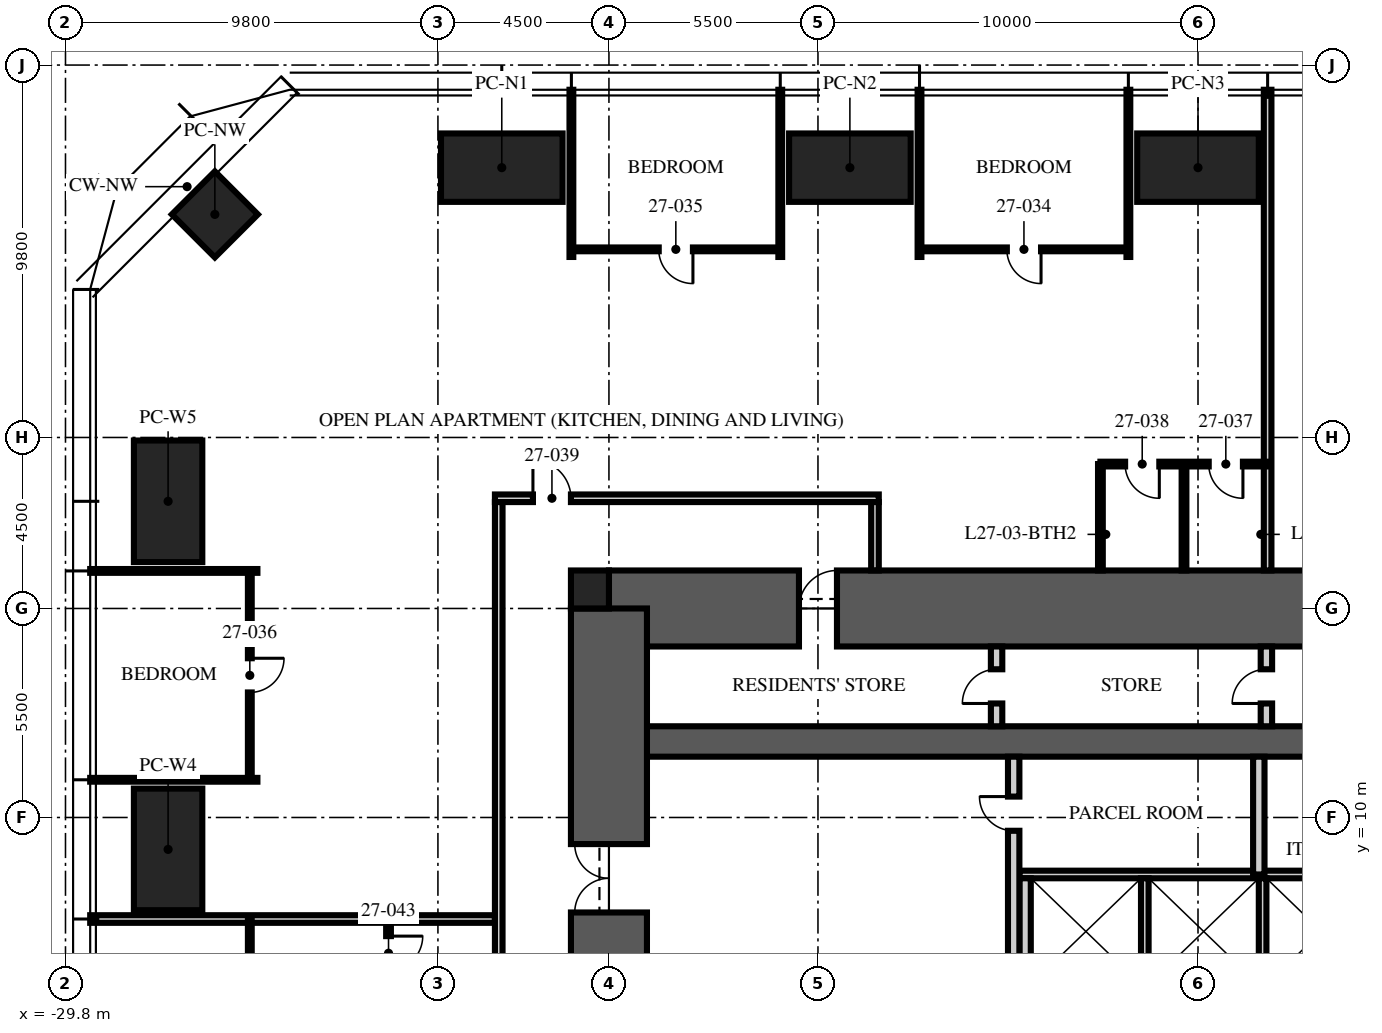
"""IFC4 building model, lengths in metres.
Left out: names, types, materials, properties, quantities, classifications, styles, units other than length and angle.
Written with IfcOpenShell. Run it as: python <this file> out.ifc"""

import sys

from ifc_helpers import new_model, si_unit, direction, frame, frame_2d, origin, origin_2d, place, context, subcontext, project, spatial, rectangle, hollow_rectangle, extrude, element, fill, save


model = new_model("IFC4")
c1 = context("Model", 3, precision=1e-05, world=origin(), true_north=direction((0.0, 1.0)))
c2 = subcontext(c1, "Body", "Model", "MODEL_VIEW")
j1 = project(units=[si_unit("LENGTHUNIT", "METRE"), si_unit("PLANEANGLEUNIT", "RADIAN")], contexts=[c1])
p1 = place(None, origin())
s1 = spatial("IfcSite", under=j1, at=p1, CompositionType="ELEMENT")
p2 = place(p1, origin())
s2 = spatial("IfcBuilding", under=s1, at=p2, CompositionType="ELEMENT")
p3 = place(p2, frame((0.0, 0.0, 111.0)))
s3 = spatial("IfcBuildingStorey", under=s2, at=p3, CompositionType="ELEMENT", Elevation=111.0)
p4 = place(p3, frame((-15.5, 15.5, -0.25), z_axis=(0.0, 0.0, 1.0), x_axis=(1.0, 0.0, 0.0)))
e1 = element("IfcWall", 1, at=p4, inside=s3, PredefinedType="SHEAR", context=c2, shape_type="SweptSolid", body=[
    extrude(rectangle(XDim=31.0, YDim=2.0, at=frame_2d((15.5, 0.0))), origin(), (0.0, 0.0, 1.0), 3.75),
])
p5 = place(p4, frame((5.0, 0.0, 0.25)))
e2 = element("IfcOpeningElement", 2, at=p5, cuts=e1, PredefinedType="OPENING", context=c2, shape_type="SweptSolid", body=[
    extrude(rectangle(XDim=1.0, YDim=2.1, at=frame_2d((0.5, 1.05))), frame((0.0, 1.01, 0.0), z_axis=(0.0, -1.0, 0.0), x_axis=(1.0, 0.0, 0.0)), (0.0, 0.0, 1.0), 2.02),
])
p6 = place(p3, frame((-15.5, 12.0, -0.25), z_axis=(0.0, 0.0, 1.0), x_axis=(1.0, 0.0, 0.0)))
e3 = element("IfcWall", 3, at=p6, inside=s3, PredefinedType="SHEAR", context=c2, shape_type="SweptSolid", body=[
    extrude(rectangle(XDim=31.0, YDim=0.8, at=frame_2d((15.5, 0.0))), origin(), (0.0, 0.0, 1.0), 3.75),
])
p7 = place(p3, frame((-15.5, -15.5, -0.25), z_axis=(0.0, 0.0, 1.0), x_axis=(0.0, 1.0, 0.0)))
e4 = element("IfcWall", 4, at=p7, inside=s3, PredefinedType="SHEAR", context=c2, shape_type="SweptSolid", body=[
    extrude(rectangle(XDim=31.0, YDim=2.0, at=frame_2d((15.5, 0.0))), origin(), (0.0, 0.0, 1.0), 3.75),
])
p8 = place(p7, frame((6.5, 0.0, 0.25)))
e5 = element("IfcOpeningElement", 5, at=p8, cuts=e4, PredefinedType="OPENING", context=c2, shape_type="SweptSolid", body=[
    extrude(rectangle(XDim=1.2, YDim=2.1, at=frame_2d((0.6, 1.05))), frame((0.0, 1.01, 0.0), z_axis=(0.0, -1.0, 0.0), x_axis=(1.0, 0.0, 0.0)), (0.0, 0.0, 1.0), 2.02),
])
p9 = place(p7, frame((23.0, 0.0, 0.25)))
e6 = element("IfcOpeningElement", 6, at=p9, cuts=e4, PredefinedType="OPENING", context=c2, shape_type="SweptSolid", body=[
    extrude(rectangle(XDim=1.8, YDim=2.1, at=frame_2d((0.9, 1.05))), frame((0.0, 1.01, 0.0), z_axis=(0.0, -1.0, 0.0), x_axis=(1.0, 0.0, 0.0)), (0.0, 0.0, 1.0), 2.02),
])
p10 = place(p3, frame((-16.0, 16.0, -0.25), z_axis=(0.0, 0.0, 1.0), x_axis=(1.0, 0.0, 0.0)))
e7 = element("IfcColumn", 7, at=p10, inside=s3, PredefinedType="COLUMN", context=c2, shape_type="SweptSolid", body=[
    extrude(rectangle(XDim=1.0, YDim=1.0, at=origin_2d()), origin(), (0.0, 0.0, 1.0), 3.75),
])
for number, where, z_axis, x_axis in (
    (8, (-18.32, 27.1, 0.0), (0.0, 0.0, 1.0), (1.0, 0.0, 0.0)),
    (9, (-9.16, 27.1, 0.0), (0.0, 0.0, 1.0), (1.0, 0.0, 0.0)),
    (10, (0.0, 27.1, 0.0), (0.0, 0.0, 1.0), (1.0, 0.0, 0.0)),
    (11, (-27.1, 9.16, 0.0), (0.0, 0.0, 1.0), (0.0, 1.0, 0.0)),
    (12, (-27.1, 18.32, 0.0), (0.0, 0.0, 1.0), (0.0, 1.0, 0.0)),
):
    element("IfcColumn", number, at=place(p3, frame(where, z_axis=z_axis, x_axis=x_axis)), inside=s3, PredefinedType="COLUMN", context=c2, shape_type="SweptSolid", body=[
        extrude(hollow_rectangle(XDim=3.2, YDim=1.8, WallThickness=0.2, at=origin_2d()), origin(), (0.0, 0.0, 1.0), 3.75),
    ])
p11 = place(p3, frame((-25.87, 25.87, 0.0), z_axis=(0.0, 0.0, 1.0), x_axis=(0.707106781187, 0.707106781187, 0.0)))
e13 = element("IfcColumn", 13, at=p11, inside=s3, PredefinedType="COLUMN", context=c2, shape_type="SweptSolid", body=[
    extrude(hollow_rectangle(XDim=1.6, YDim=1.6, WallThickness=0.1, at=origin_2d()), origin(), (0.0, 0.0, 1.0), 3.75),
])
p12 = place(p3, frame((-4.7, 8.5, 0.0), z_axis=(0.0, 0.0, 1.0), x_axis=(1.0, 0.0, 0.0)))
e14 = element("IfcWall", 14, at=p12, inside=s3, PredefinedType="PARTITIONING", context=c2, shape_type="SweptSolid", body=[
    extrude(rectangle(XDim=9.7, YDim=0.2, at=frame_2d((4.85, 0.0))), origin(), (0.0, 0.0, 1.0), 3.5),
])
p13 = place(p3, frame((-4.55, 5.6, 0.0), z_axis=(0.0, 0.0, 1.0), x_axis=(0.0, 1.0, 0.0)))
e15 = element("IfcWall", 15, at=p13, inside=s3, PredefinedType="PARTITIONING", context=c2, shape_type="SweptSolid", body=[
    extrude(rectangle(XDim=2.8, YDim=0.3, at=frame_2d((1.4, 0.0))), origin(), (0.0, 0.0, 1.0), 3.5),
])
for number, where, z_axis, x_axis in (
    (16, (-1.4, 5.6, 0.0), (0.0, 0.0, 1.0), (0.0, 1.0, 0.0)),
    (17, (1.7, 5.6, 0.0), (0.0, 0.0, 1.0), (0.0, 1.0, 0.0)),
):
    element("IfcWall", number, at=place(p3, frame(where, z_axis=z_axis, x_axis=x_axis)), inside=s3, PredefinedType="PARTITIONING", context=c2, shape_type="SweptSolid", body=[
        extrude(rectangle(XDim=2.8, YDim=0.2, at=frame_2d((1.4, 0.0))), origin(), (0.0, 0.0, 1.0), 3.5),
    ])
p14 = place(p3, frame((-4.85, 5.3, 0.0), z_axis=(0.0, 0.0, 1.0), x_axis=(0.0, 1.0, 0.0)))
e18 = element("IfcWall", 18, at=p14, inside=s3, PredefinedType="PARTITIONING", context=c2, shape_type="SweptSolid", body=[
    extrude(rectangle(XDim=6.3, YDim=0.3, at=frame_2d((3.15, 0.0))), origin(), (0.0, 0.0, 1.0), 3.5),
])
p15 = place(p14, frame((4.35, 0.0, 0.0)))
e19 = element("IfcOpeningElement", 19, at=p15, cuts=e18, PredefinedType="OPENING", context=c2, shape_type="SweptSolid", body=[
    extrude(rectangle(XDim=0.9, YDim=2.1, at=frame_2d((0.45, 1.05))), frame((0.0, 0.16, 0.0), z_axis=(0.0, -1.0, 0.0), x_axis=(1.0, 0.0, 0.0)), (0.0, 0.0, 1.0), 0.32),
])
p16 = place(p3, frame((1.6, 8.5, 0.0), z_axis=(0.0, 0.0, 1.0), x_axis=(0.0, 1.0, 0.0)))
e20 = element("IfcWall", 20, at=p16, inside=s3, PredefinedType="PARTITIONING", context=c2, shape_type="SweptSolid", body=[
    extrude(rectangle(XDim=3.1, YDim=0.3, at=frame_2d((1.55, 0.0))), origin(), (0.0, 0.0, 1.0), 3.5),
])
p17 = place(p3, frame((-5.3, 12.4, 0.0), z_axis=(0.0, 0.0, 1.0), x_axis=(0.0, 1.0, 0.0)))
e21 = element("IfcWall", 21, at=p17, inside=s3, PredefinedType="PARTITIONING", context=c2, shape_type="SweptSolid", body=[
    extrude(rectangle(XDim=2.1, YDim=0.3, at=frame_2d((1.05, 0.0))), origin(), (0.0, 0.0, 1.0), 3.5),
])
p18 = place(p17, frame((0.6, 0.0, 0.0)))
e22 = element("IfcOpeningElement", 22, at=p18, cuts=e21, PredefinedType="OPENING", context=c2, shape_type="SweptSolid", body=[
    extrude(rectangle(XDim=0.9, YDim=2.1, at=frame_2d((0.45, 1.05))), frame((0.0, 0.16, 0.0), z_axis=(0.0, -1.0, 0.0), x_axis=(1.0, 0.0, 0.0)), (0.0, 0.0, 1.0), 0.32),
])
p19 = place(p3, frame((1.8, 12.4, 0.0), z_axis=(0.0, 0.0, 1.0), x_axis=(0.0, 1.0, 0.0)))
e23 = element("IfcWall", 23, at=p19, inside=s3, PredefinedType="PARTITIONING", context=c2, shape_type="SweptSolid", body=[
    extrude(rectangle(XDim=2.1, YDim=0.3, at=frame_2d((1.05, 0.0))), origin(), (0.0, 0.0, 1.0), 3.5),
])
p20 = place(p19, frame((0.6, 0.0, 0.0)))
e24 = element("IfcOpeningElement", 24, at=p20, cuts=e23, PredefinedType="OPENING", context=c2, shape_type="SweptSolid", body=[
    extrude(rectangle(XDim=0.9, YDim=2.1, at=frame_2d((0.45, 1.05))), frame((0.0, 0.16, 0.0), z_axis=(0.0, -1.0, 0.0), x_axis=(1.0, 0.0, 0.0)), (0.0, 0.0, 1.0), 0.32),
])
p21 = place(p3, frame((-18.5, 18.4, 0.0), z_axis=(0.0, 0.0, 1.0), x_axis=(1.0, 0.0, 0.0)))
e25 = element("IfcWall", 25, at=p21, inside=s3, PredefinedType="PARTITIONING", context=c2, shape_type="SweptSolid", body=[
    extrude(rectangle(XDim=10.1, YDim=0.2, at=frame_2d((5.05, 0.0))), origin(), (0.0, 0.0, 1.0), 2.3),
])
p22 = place(p21, frame((1.0, 0.0, 0.0)))
e26 = element("IfcOpeningElement", 26, at=p22, cuts=e25, PredefinedType="OPENING", context=c2, shape_type="SweptSolid", body=[
    extrude(rectangle(XDim=1.0, YDim=2.2, at=frame_2d((0.5, 1.1))), frame((0.0, 0.11, 0.0), z_axis=(0.0, -1.0, 0.0), x_axis=(1.0, 0.0, 0.0)), (0.0, 0.0, 1.0), 0.22),
])
p23 = place(p3, frame((-8.5, 18.3, 0.0), z_axis=(0.0, 0.0, 1.0), x_axis=(0.0, -1.0, 0.0)))
e27 = element("IfcWall", 27, at=p23, inside=s3, PredefinedType="PARTITIONING", context=c2, shape_type="SweptSolid", body=[
    extrude(rectangle(XDim=1.8, YDim=0.2, at=frame_2d((0.9, 0.0))), origin(), (0.0, 0.0, 1.0), 3.5),
])
p24 = place(p3, frame((1.832, 16.5, 0.0), z_axis=(0.0, 0.0, 1.0), x_axis=(0.0, 1.0, 0.0)))
e28 = element("IfcWall", 28, at=p24, inside=s3, PredefinedType="PARTITIONING", context=c2, shape_type="SweptSolid", body=[
    extrude(rectangle(XDim=12.65, YDim=0.2, at=frame_2d((6.325, 0.0))), origin(), (0.0, 0.0, 1.0), 2.81),
])
for number, where, z_axis, x_axis in (
    (29, (-1.832, 24.75, 0.0), (0.0, 0.0, 1.0), (0.0, 1.0, 0.0)),
    (30, (-7.328, 24.75, 0.0), (0.0, 0.0, 1.0), (0.0, 1.0, 0.0)),
    (31, (-10.992, 24.75, 0.0), (0.0, 0.0, 1.0), (0.0, 1.0, 0.0)),
    (32, (-16.488, 24.75, 0.0), (0.0, 0.0, 1.0), (0.0, 1.0, 0.0)),
    (33, (-24.75, 16.488, 0.0), (0.0, 0.0, 1.0), (-1.0, 0.0, 0.0)),
    (34, (-24.75, 10.992, 0.0), (0.0, 0.0, 1.0), (-1.0, 0.0, 0.0)),
):
    element("IfcWall", number, at=place(p3, frame(where, z_axis=z_axis, x_axis=x_axis)), inside=s3, PredefinedType="PARTITIONING", context=c2, shape_type="SweptSolid", body=[
        extrude(rectangle(XDim=4.4, YDim=0.1, at=frame_2d((2.2, 0.0))), origin(), (0.0, 0.0, 1.0), 2.81),
    ])
p25 = place(p3, frame((-18.5, 7.328, 0.0), z_axis=(0.0, 0.0, 1.0), x_axis=(-1.0, 0.0, 0.0)))
e35 = element("IfcWall", 35, at=p25, inside=s3, PredefinedType="PARTITIONING", context=c2, shape_type="SweptSolid", body=[
    extrude(rectangle(XDim=10.65, YDim=0.2, at=frame_2d((5.325, 0.0))), origin(), (0.0, 0.0, 1.0), 2.81),
])
p26 = place(p3, frame((-1.832, 24.95, 0.0), z_axis=(0.0, 0.0, 1.0), x_axis=(-1.0, 0.0, 0.0)))
e36 = element("IfcWall", 36, at=p26, inside=s3, PredefinedType="PARTITIONING", context=c2, shape_type="SweptSolid", body=[
    extrude(rectangle(XDim=5.496, YDim=0.1, at=frame_2d((2.748, 0.0))), origin(), (0.0, 0.0, 1.0), 2.81),
])
p27 = place(p26, frame((2.298, 0.0, 0.0)))
e37 = element("IfcOpeningElement", 37, at=p27, cuts=e36, PredefinedType="OPENING", context=c2, shape_type="SweptSolid", body=[
    extrude(rectangle(XDim=0.9, YDim=2.1, at=frame_2d((0.45, 1.05))), frame((0.0, 0.06, 0.0), z_axis=(0.0, -1.0, 0.0), x_axis=(1.0, 0.0, 0.0)), (0.0, 0.0, 1.0), 0.12),
])
p28 = place(p3, frame((-10.992, 24.95, 0.0), z_axis=(0.0, 0.0, 1.0), x_axis=(-1.0, 0.0, 0.0)))
e38 = element("IfcWall", 38, at=p28, inside=s3, PredefinedType="PARTITIONING", context=c2, shape_type="SweptSolid", body=[
    extrude(rectangle(XDim=5.496, YDim=0.1, at=frame_2d((2.748, 0.0))), origin(), (0.0, 0.0, 1.0), 2.81),
])
p29 = place(p28, frame((2.298, 0.0, 0.0)))
e39 = element("IfcOpeningElement", 39, at=p29, cuts=e38, PredefinedType="OPENING", context=c2, shape_type="SweptSolid", body=[
    extrude(rectangle(XDim=0.9, YDim=2.1, at=frame_2d((0.45, 1.05))), frame((0.0, 0.06, 0.0), z_axis=(0.0, -1.0, 0.0), x_axis=(1.0, 0.0, 0.0)), (0.0, 0.0, 1.0), 0.12),
])
p30 = place(p3, frame((-24.95, 16.488, 0.0), z_axis=(0.0, 0.0, 1.0), x_axis=(0.0, -1.0, 0.0)))
e40 = element("IfcWall", 40, at=p30, inside=s3, PredefinedType="PARTITIONING", context=c2, shape_type="SweptSolid", body=[
    extrude(rectangle(XDim=5.496, YDim=0.1, at=frame_2d((2.748, 0.0))), origin(), (0.0, 0.0, 1.0), 2.81),
])
p31 = place(p30, frame((2.298, 0.0, 0.0)))
e41 = element("IfcOpeningElement", 41, at=p31, cuts=e40, PredefinedType="OPENING", context=c2, shape_type="SweptSolid", body=[
    extrude(rectangle(XDim=0.9, YDim=2.1, at=frame_2d((0.45, 1.05))), frame((0.0, 0.06, 0.0), z_axis=(0.0, -1.0, 0.0), x_axis=(1.0, 0.0, 0.0)), (0.0, 0.0, 1.0), 0.12),
])
p32 = place(p3, frame((1.832, 19.3, 0.0), z_axis=(0.0, 0.0, 1.0), x_axis=(-1.0, 0.0, 0.0)))
e42 = element("IfcWall", 42, at=p32, inside=s3, PredefinedType="PARTITIONING", context=c2, shape_type="SweptSolid", body=[
    extrude(rectangle(XDim=4.4, YDim=0.125, at=frame_2d((2.2, 0.0))), origin(), (0.0, 0.0, 1.0), 2.7),
])
p33 = place(p32, frame((0.65, 0.0, 0.0)))
e43 = element("IfcOpeningElement", 43, at=p33, cuts=e42, PredefinedType="OPENING", context=c2, shape_type="SweptSolid", body=[
    extrude(rectangle(XDim=0.9, YDim=2.1, at=frame_2d((0.45, 1.05))), frame((0.0, 0.073, 0.0), z_axis=(0.0, -1.0, 0.0), x_axis=(1.0, 0.0, 0.0)), (0.0, 0.0, 1.0), 0.145),
])
p34 = place(p32, frame((2.85, 0.0, 0.0)))
e44 = element("IfcOpeningElement", 44, at=p34, cuts=e42, PredefinedType="OPENING", context=c2, shape_type="SweptSolid", body=[
    extrude(rectangle(XDim=0.9, YDim=2.1, at=frame_2d((0.45, 1.05))), frame((0.0, 0.073, 0.0), z_axis=(0.0, -1.0, 0.0), x_axis=(1.0, 0.0, 0.0)), (0.0, 0.0, 1.0), 0.145),
])
for number, where, z_axis, x_axis in (
    (45, (-0.368, 16.5, 0.0), (0.0, 0.0, 1.0), (0.0, 1.0, 0.0)),
    (46, (-2.568, 16.5, 0.0), (0.0, 0.0, 1.0), (0.0, 1.0, 0.0)),
):
    element("IfcWall", number, at=place(p3, frame(where, z_axis=z_axis, x_axis=x_axis)), inside=s3, PredefinedType="PARTITIONING", context=c2, shape_type="SweptSolid", body=[
        extrude(rectangle(XDim=2.8, YDim=0.125, at=frame_2d((1.4, 0.0))), origin(), (0.0, 0.0, 1.0), 3.5),
    ])
p35 = place(p3, frame((-24.95, 7.328, 0.0), z_axis=(0.0, 0.0, 1.0), x_axis=(0.0, -1.0, 0.0)))
e47 = element("IfcWall", 47, at=p35, inside=s3, PredefinedType="PARTITIONING", context=c2, shape_type="SweptSolid", body=[
    extrude(rectangle(XDim=5.496, YDim=0.1, at=frame_2d((2.748, 0.0))), origin(), (0.0, 0.0, 1.0), 2.81),
])
p36 = place(p35, frame((2.298, 0.0, 0.0)))
e48 = element("IfcOpeningElement", 48, at=p36, cuts=e47, PredefinedType="OPENING", context=c2, shape_type="SweptSolid", body=[
    extrude(rectangle(XDim=0.9, YDim=2.1, at=frame_2d((0.45, 1.05))), frame((0.0, 0.06, 0.0), z_axis=(0.0, -1.0, 0.0), x_axis=(1.0, 0.0, 0.0)), (0.0, 0.0, 1.0), 0.12),
])
p37 = place(p3, frame((-21.3, 7.328, 0.0), z_axis=(0.0, 0.0, 1.0), x_axis=(0.0, -1.0, 0.0)))
e49 = element("IfcWall", 49, at=p37, inside=s3, PredefinedType="PARTITIONING", context=c2, shape_type="SweptSolid", body=[
    extrude(rectangle(XDim=1.8, YDim=0.125, at=frame_2d((0.9, 0.0))), origin(), (0.0, 0.0, 1.0), 3.5),
])
p38 = place(p37, frame((0.45, 0.0, 0.0)))
e50 = element("IfcOpeningElement", 50, at=p38, cuts=e49, PredefinedType="OPENING", context=c2, shape_type="SweptSolid", body=[
    extrude(rectangle(XDim=0.9, YDim=2.1, at=frame_2d((0.45, 1.05))), frame((0.0, 0.073, 0.0), z_axis=(0.0, -1.0, 0.0), x_axis=(1.0, 0.0, 0.0)), (0.0, 0.0, 1.0), 0.145),
])
p39 = place(p3, frame((-18.4, 18.3, 0.0), z_axis=(0.0, 0.0, 1.0), x_axis=(0.0, -1.0, 0.0)))
e51 = element("IfcWall", 51, at=p39, inside=s3, PredefinedType="PARTITIONING", context=c2, shape_type="SweptSolid", body=[
    extrude(rectangle(XDim=27.292, YDim=0.2, at=frame_2d((13.646, 0.0))), origin(), (0.0, 0.0, 1.0), 2.3),
])
p40 = place(p9, origin())
e52 = element("IfcDoor", 52, at=p40, inside=s3, OperationType="DOUBLE_DOOR_SINGLE_SWING", PredefinedType="DOOR", context=c2, shape_type="SweptSolid", body=[
    extrude(rectangle(XDim=1.8, YDim=2.1, at=frame_2d((0.9, 1.05))), frame((0.0, 0.025, 0.0), z_axis=(0.0, -1.0, 0.0), x_axis=(1.0, 0.0, 0.0)), (0.0, 0.0, 1.0), 0.05),
])
fill(e6, e52)
p41 = place(p15, origin())
e53 = element("IfcDoor", 53, at=p41, inside=s3, OperationType="SINGLE_SWING_RIGHT", PredefinedType="DOOR", context=c2, shape_type="SweptSolid", body=[
    extrude(rectangle(XDim=0.9, YDim=2.1, at=frame_2d((0.45, 1.05))), frame((0.0, 0.025, 0.0), z_axis=(0.0, -1.0, 0.0), x_axis=(1.0, 0.0, 0.0)), (0.0, 0.0, 1.0), 0.05),
])
fill(e19, e53)
p42 = place(p18, origin())
e54 = element("IfcDoor", 54, at=p42, inside=s3, OperationType="SINGLE_SWING_LEFT", PredefinedType="DOOR", context=c2, shape_type="SweptSolid", body=[
    extrude(rectangle(XDim=0.9, YDim=2.1, at=frame_2d((0.45, 1.05))), frame((0.0, 0.025, 0.0), z_axis=(0.0, -1.0, 0.0), x_axis=(1.0, 0.0, 0.0)), (0.0, 0.0, 1.0), 0.05),
])
fill(e22, e54)
p43 = place(p20, origin())
e55 = element("IfcDoor", 55, at=p43, inside=s3, OperationType="SINGLE_SWING_LEFT", PredefinedType="DOOR", context=c2, shape_type="SweptSolid", body=[
    extrude(rectangle(XDim=0.9, YDim=2.1, at=frame_2d((0.45, 1.05))), frame((0.0, 0.025, 0.0), z_axis=(0.0, -1.0, 0.0), x_axis=(1.0, 0.0, 0.0)), (0.0, 0.0, 1.0), 0.05),
])
fill(e24, e55)
p44 = place(p5, origin())
e56 = element("IfcDoor", 56, at=p44, inside=s3, OperationType="SINGLE_SWING_RIGHT", PredefinedType="DOOR", context=c2, shape_type="SweptSolid", body=[
    extrude(rectangle(XDim=1.0, YDim=2.1, at=frame_2d((0.5, 1.05))), frame((0.0, 0.025, 0.0), z_axis=(0.0, -1.0, 0.0), x_axis=(1.0, 0.0, 0.0)), (0.0, 0.0, 1.0), 0.05),
])
fill(e2, e56)
p45 = place(p27, origin())
e57 = element("IfcDoor", 57, at=p45, inside=s3, OperationType="SINGLE_SWING_LEFT", PredefinedType="DOOR", context=c2, shape_type="SweptSolid", body=[
    extrude(rectangle(XDim=0.9, YDim=2.1, at=frame_2d((0.45, 1.05))), frame((0.0, 0.025, 0.0), z_axis=(0.0, -1.0, 0.0), x_axis=(1.0, 0.0, 0.0)), (0.0, 0.0, 1.0), 0.05),
])
fill(e37, e57)
p46 = place(p29, origin())
e58 = element("IfcDoor", 58, at=p46, inside=s3, OperationType="SINGLE_SWING_LEFT", PredefinedType="DOOR", context=c2, shape_type="SweptSolid", body=[
    extrude(rectangle(XDim=0.9, YDim=2.1, at=frame_2d((0.45, 1.05))), frame((0.0, 0.025, 0.0), z_axis=(0.0, -1.0, 0.0), x_axis=(1.0, 0.0, 0.0)), (0.0, 0.0, 1.0), 0.05),
])
fill(e39, e58)
p47 = place(p31, origin())
e59 = element("IfcDoor", 59, at=p47, inside=s3, OperationType="SINGLE_SWING_LEFT", PredefinedType="DOOR", context=c2, shape_type="SweptSolid", body=[
    extrude(rectangle(XDim=0.9, YDim=2.1, at=frame_2d((0.45, 1.05))), frame((0.0, 0.025, 0.0), z_axis=(0.0, -1.0, 0.0), x_axis=(1.0, 0.0, 0.0)), (0.0, 0.0, 1.0), 0.05),
])
fill(e41, e59)
p48 = place(p33, origin())
e60 = element("IfcDoor", 60, at=p48, inside=s3, OperationType="SINGLE_SWING_LEFT", PredefinedType="DOOR", context=c2, shape_type="SweptSolid", body=[
    extrude(rectangle(XDim=0.9, YDim=2.1, at=frame_2d((0.45, 1.05))), frame((0.0, 0.025, 0.0), z_axis=(0.0, -1.0, 0.0), x_axis=(1.0, 0.0, 0.0)), (0.0, 0.0, 1.0), 0.05),
])
fill(e43, e60)
p49 = place(p34, origin())
e61 = element("IfcDoor", 61, at=p49, inside=s3, OperationType="SINGLE_SWING_LEFT", PredefinedType="DOOR", context=c2, shape_type="SweptSolid", body=[
    extrude(rectangle(XDim=0.9, YDim=2.1, at=frame_2d((0.45, 1.05))), frame((0.0, 0.025, 0.0), z_axis=(0.0, -1.0, 0.0), x_axis=(1.0, 0.0, 0.0)), (0.0, 0.0, 1.0), 0.05),
])
fill(e44, e61)
p50 = place(p22, origin())
e62 = element("IfcDoor", 62, at=p50, inside=s3, OperationType="SINGLE_SWING_LEFT", PredefinedType="DOOR", context=c2, shape_type="SweptSolid", body=[
    extrude(rectangle(XDim=1.0, YDim=2.2, at=frame_2d((0.5, 1.1))), frame((0.0, 0.025, 0.0), z_axis=(0.0, -1.0, 0.0), x_axis=(1.0, 0.0, 0.0)), (0.0, 0.0, 1.0), 0.05),
])
fill(e26, e62)
p51 = place(p38, origin())
e63 = element("IfcDoor", 63, at=p51, inside=s3, OperationType="SINGLE_SWING_LEFT", PredefinedType="DOOR", context=c2, shape_type="SweptSolid", body=[
    extrude(rectangle(XDim=0.9, YDim=2.1, at=frame_2d((0.45, 1.05))), frame((0.0, 0.025, 0.0), z_axis=(0.0, -1.0, 0.0), x_axis=(1.0, 0.0, 0.0)), (0.0, 0.0, 1.0), 0.05),
])
fill(e50, e63)
save(model, sys.argv[1])
